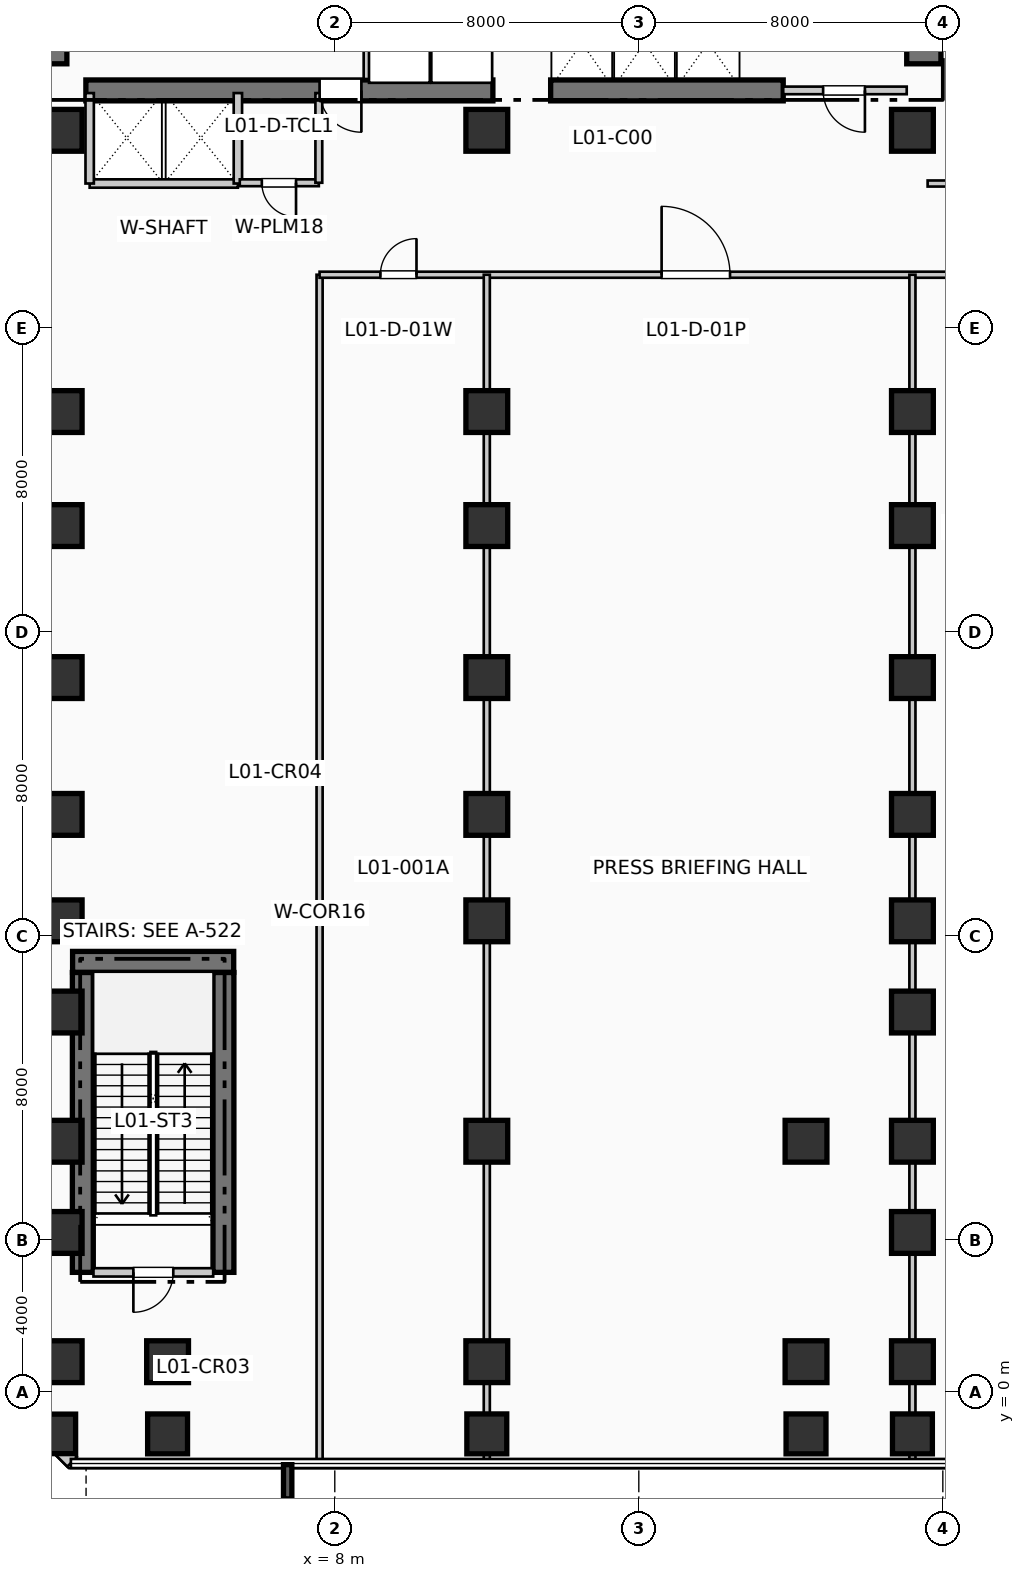
"""IFC4 building model, lengths in metres.
Left out: names, types, materials, properties, quantities, classifications, styles, units other than length and angle.
Written with IfcOpenShell. Run it as: python <this file> out.ifc"""

import sys

from ifc_helpers import new_model, si_unit, direction, frame, frame_2d, origin, origin_2d, place, context, subcontext, project, spatial, rectangle, extrude, element, fill, save


model = new_model("IFC4")
c1 = context("Model", 3, precision=1e-05, world=origin(), true_north=direction((0.0, 1.0)))
c2 = subcontext(c1, "Body", "Model", "MODEL_VIEW")
j1 = project(units=[si_unit("LENGTHUNIT", "METRE"), si_unit("PLANEANGLEUNIT", "RADIAN")], contexts=[c1])
p1 = place(None, origin())
s1 = spatial("IfcSite", under=j1, at=p1, CompositionType="ELEMENT")
p2 = place(p1, origin())
s2 = spatial("IfcBuilding", under=s1, at=p2, CompositionType="ELEMENT")
p3 = place(p2, frame((0.0, 0.0, 5.94)))
s3 = spatial("IfcBuildingStorey", under=s2, at=p3, CompositionType="ELEMENT", Elevation=5.94)
p4 = place(p3, frame((0.5, 34.95, 0.0), z_axis=(0.0, 0.0, 1.0), x_axis=(0.0, 1.0, 0.0)))
e1 = element("IfcWall", 1, at=p4, inside=s3, PredefinedType="SHEAR", context=c2, shape_type="SweptSolid", body=[
    extrude(rectangle(XDim=7.9, YDim=0.9, at=frame_2d((3.95, 0.0))), origin(), (0.0, 0.0, 1.0), 5.28),
])
p5 = place(p3, frame((23.5, 34.95, 0.0), z_axis=(0.0, 0.0, 1.0), x_axis=(0.0, 1.0, 0.0)))
e2 = element("IfcWall", 2, at=p5, inside=s3, PredefinedType="SHEAR", context=c2, shape_type="SweptSolid", body=[
    extrude(rectangle(XDim=10.64, YDim=0.9, at=frame_2d((5.32, 0.0))), origin(), (0.0, 0.0, 1.0), 5.28),
])
p6 = place(p3, frame((1.45, 34.25, 0.0), z_axis=(0.0, 0.0, 1.0), x_axis=(1.0, 0.0, 0.0)))
e3 = element("IfcWall", 3, at=p6, inside=s3, PredefinedType="SHEAR", context=c2, shape_type="SweptSolid", body=[
    extrude(rectangle(XDim=10.71, YDim=0.55, at=frame_2d((5.355, 0.0))), origin(), (0.0, 0.0, 1.0), 5.28),
])
p7 = place(p6, frame((7.25, 0.0, 0.0), z_axis=(0.0, 0.0, 1.0), x_axis=(-1.0, 0.0, 0.0)))
e4 = element("IfcOpeningElement", 4, at=p7, cuts=e3, PredefinedType="OPENING", context=c2, shape_type="SweptSolid", body=[
    extrude(rectangle(XDim=1.1, YDim=2.15, at=frame_2d((0.55, 1.075))), frame((0.0, 0.285, 0.0), z_axis=(0.0, -1.0, 0.0), x_axis=(1.0, 0.0, 0.0)), (0.0, 0.0, 1.0), 0.57),
])
p8 = place(p3, frame((13.68, 34.25, 0.0), z_axis=(0.0, 0.0, 1.0), x_axis=(1.0, 0.0, 0.0)))
e5 = element("IfcWall", 5, at=p8, inside=s3, PredefinedType="SHEAR", context=c2, shape_type="SweptSolid", body=[
    extrude(rectangle(XDim=6.12, YDim=0.55, at=frame_2d((3.06, 0.0))), origin(), (0.0, 0.0, 1.0), 5.28),
])
for number, where, z_axis, x_axis in (
    (6, (1.37, 3.15, 0.0), (0.0, 0.0, 1.0), (0.0, 1.0, 0.0)),
    (7, (5.07, 3.15, 0.0), (0.0, 0.0, 1.0), (0.0, 1.0, 0.0)),
):
    element("IfcWall", number, at=place(p3, frame(where, z_axis=z_axis, x_axis=x_axis)), inside=s3, PredefinedType="SHEAR", context=c2, shape_type="SweptSolid", body=[
        extrude(rectangle(XDim=7.89, YDim=0.55, at=frame_2d((3.945, 0.0))), origin(), (0.0, 0.0, 1.0), 5.28),
    ])
p9 = place(p3, frame((1.1, 11.32, 0.0), z_axis=(0.0, 0.0, 1.0), x_axis=(1.0, 0.0, 0.0)))
e8 = element("IfcWall", 8, at=p9, inside=s3, PredefinedType="SHEAR", context=c2, shape_type="SweptSolid", body=[
    extrude(rectangle(XDim=4.24, YDim=0.55, at=frame_2d((2.12, 0.0))), origin(), (0.0, 0.0, 1.0), 5.28),
])
p10 = place(p3, frame((0.8, -1.1, 0.0), z_axis=(0.0, 0.0, 1.0), x_axis=(1.0, 0.0, 0.0)))
e9 = element("IfcColumn", 9, at=p10, inside=s3, PredefinedType="PILASTER", context=c2, shape_type="SweptSolid", body=[
    extrude(rectangle(XDim=0.76, YDim=1.04, at=origin_2d()), origin(), (0.0, 0.0, 1.0), 5.28),
])
for number, where, z_axis, x_axis in (
    (10, (0.8, 0.8, 0.0), (0.0, 0.0, 1.0), (1.0, 0.0, 0.0)),
    (11, (0.8, 4.2, 0.0), (0.0, 0.0, 1.0), (1.0, 0.0, 0.0)),
    (12, (0.8, 6.6, 0.0), (0.0, 0.0, 1.0), (1.0, 0.0, 0.0)),
    (13, (0.8, 10.0, 0.0), (0.0, 0.0, 1.0), (1.0, 0.0, 0.0)),
    (14, (0.8, 12.4, 0.0), (0.0, 0.0, 1.0), (1.0, 0.0, 0.0)),
    (15, (0.8, 15.2, 0.0), (0.0, 0.0, 1.0), (1.0, 0.0, 0.0)),
    (16, (0.8, 18.8, 0.0), (0.0, 0.0, 1.0), (1.0, 0.0, 0.0)),
    (17, (0.8, 22.8, 0.0), (0.0, 0.0, 1.0), (1.0, 0.0, 0.0)),
    (18, (0.8, 25.8, 0.0), (0.0, 0.0, 1.0), (1.0, 0.0, 0.0)),
    (19, (0.8, 33.2, 0.0), (0.0, 0.0, 1.0), (1.0, 0.0, 0.0)),
):
    element("IfcColumn", number, at=place(p3, frame(where, z_axis=z_axis, x_axis=x_axis)), inside=s3, PredefinedType="COLUMN", context=c2, shape_type="SweptSolid", body=[
        extrude(rectangle(XDim=1.1, YDim=1.1, at=origin_2d()), origin(), (0.0, 0.0, 1.0), 5.28),
    ])
p11 = place(p3, frame((3.6, -1.1, 0.0), z_axis=(0.0, 0.0, 1.0), x_axis=(1.0, 0.0, 0.0)))
e20 = element("IfcColumn", 20, at=p11, inside=s3, PredefinedType="COLUMN", context=c2, shape_type="SweptSolid", body=[
    extrude(rectangle(XDim=1.05, YDim=1.05, at=origin_2d()), origin(), (0.0, 0.0, 1.0), 5.28),
])
p12 = place(p3, frame((3.6, 0.8, 0.0), z_axis=(0.0, 0.0, 1.0), x_axis=(1.0, 0.0, 0.0)))
e21 = element("IfcColumn", 21, at=p12, inside=s3, PredefinedType="COLUMN", context=c2, shape_type="SweptSolid", body=[
    extrude(rectangle(XDim=1.1, YDim=1.1, at=origin_2d()), origin(), (0.0, 0.0, 1.0), 5.28),
])
p13 = place(p3, frame((12.0, -1.1, 0.0), z_axis=(0.0, 0.0, 1.0), x_axis=(1.0, 0.0, 0.0)))
e22 = element("IfcColumn", 22, at=p13, inside=s3, PredefinedType="COLUMN", context=c2, shape_type="SweptSolid", body=[
    extrude(rectangle(XDim=1.05, YDim=1.05, at=origin_2d()), origin(), (0.0, 0.0, 1.0), 5.28),
])
for number, where, z_axis, x_axis in (
    (23, (12.0, 0.8, 0.0), (0.0, 0.0, 1.0), (1.0, 0.0, 0.0)),
    (24, (12.0, 6.6, 0.0), (0.0, 0.0, 1.0), (1.0, 0.0, 0.0)),
    (25, (12.0, 12.4, 0.0), (0.0, 0.0, 1.0), (1.0, 0.0, 0.0)),
    (26, (12.0, 15.2, 0.0), (0.0, 0.0, 1.0), (1.0, 0.0, 0.0)),
    (27, (12.0, 18.8, 0.0), (0.0, 0.0, 1.0), (1.0, 0.0, 0.0)),
    (28, (12.0, 22.8, 0.0), (0.0, 0.0, 1.0), (1.0, 0.0, 0.0)),
    (29, (12.0, 25.8, 0.0), (0.0, 0.0, 1.0), (1.0, 0.0, 0.0)),
    (30, (12.0, 33.2, 0.0), (0.0, 0.0, 1.0), (1.0, 0.0, 0.0)),
):
    element("IfcColumn", number, at=place(p3, frame(where, z_axis=z_axis, x_axis=x_axis)), inside=s3, PredefinedType="COLUMN", context=c2, shape_type="SweptSolid", body=[
        extrude(rectangle(XDim=1.1, YDim=1.1, at=origin_2d()), origin(), (0.0, 0.0, 1.0), 5.28),
    ])
p14 = place(p3, frame((20.4, -1.1, 0.0), z_axis=(0.0, 0.0, 1.0), x_axis=(1.0, 0.0, 0.0)))
e31 = element("IfcColumn", 31, at=p14, inside=s3, PredefinedType="COLUMN", context=c2, shape_type="SweptSolid", body=[
    extrude(rectangle(XDim=1.05, YDim=1.05, at=origin_2d()), origin(), (0.0, 0.0, 1.0), 5.28),
])
for number, where, z_axis, x_axis in (
    (32, (20.4, 0.8, 0.0), (0.0, 0.0, 1.0), (1.0, 0.0, 0.0)),
    (33, (20.4, 6.6, 0.0), (0.0, 0.0, 1.0), (1.0, 0.0, 0.0)),
):
    element("IfcColumn", number, at=place(p3, frame(where, z_axis=z_axis, x_axis=x_axis)), inside=s3, PredefinedType="COLUMN", context=c2, shape_type="SweptSolid", body=[
        extrude(rectangle(XDim=1.1, YDim=1.1, at=origin_2d()), origin(), (0.0, 0.0, 1.0), 5.28),
    ])
p15 = place(p3, frame((23.2, -1.1, 0.0), z_axis=(0.0, 0.0, 1.0), x_axis=(1.0, 0.0, 0.0)))
e34 = element("IfcColumn", 34, at=p15, inside=s3, PredefinedType="COLUMN", context=c2, shape_type="SweptSolid", body=[
    extrude(rectangle(XDim=1.05, YDim=1.05, at=origin_2d()), origin(), (0.0, 0.0, 1.0), 5.28),
])
for number, where, z_axis, x_axis in (
    (35, (23.2, 0.8, 0.0), (0.0, 0.0, 1.0), (1.0, 0.0, 0.0)),
    (36, (23.2, 4.2, 0.0), (0.0, 0.0, 1.0), (1.0, 0.0, 0.0)),
    (37, (23.2, 6.6, 0.0), (0.0, 0.0, 1.0), (1.0, 0.0, 0.0)),
    (38, (23.2, 10.0, 0.0), (0.0, 0.0, 1.0), (1.0, 0.0, 0.0)),
    (39, (23.2, 12.4, 0.0), (0.0, 0.0, 1.0), (1.0, 0.0, 0.0)),
    (40, (23.2, 15.2, 0.0), (0.0, 0.0, 1.0), (1.0, 0.0, 0.0)),
    (41, (23.2, 18.8, 0.0), (0.0, 0.0, 1.0), (1.0, 0.0, 0.0)),
    (42, (23.2, 22.8, 0.0), (0.0, 0.0, 1.0), (1.0, 0.0, 0.0)),
    (43, (23.2, 25.8, 0.0), (0.0, 0.0, 1.0), (1.0, 0.0, 0.0)),
    (44, (23.2, 33.2, 0.0), (0.0, 0.0, 1.0), (1.0, 0.0, 0.0)),
):
    element("IfcColumn", number, at=place(p3, frame(where, z_axis=z_axis, x_axis=x_axis)), inside=s3, PredefinedType="COLUMN", context=c2, shape_type="SweptSolid", body=[
        extrude(rectangle(XDim=1.1, YDim=1.1, at=origin_2d()), origin(), (0.0, 0.0, 1.0), 5.28),
    ])
p16 = place(p3, frame((-1.834, 1.088, 0.0), z_axis=(0.0, 0.0, 1.0), x_axis=(0.707106781187, -0.707106781187, 0.0)))
e45 = element("IfcWall", 45, at=p16, inside=s3, PredefinedType="SOLIDWALL", context=c2, shape_type="SweptSolid", body=[
    extrude(rectangle(XDim=4.133, YDim=0.36, at=frame_2d((2.066, 0.0))), origin(), (0.0, 0.0, 1.0), 4.96),
])
p17 = place(p3, frame((8.86, 34.55, 0.0), z_axis=(0.0, 0.0, 1.0), x_axis=(0.0, 1.0, 0.0)))
e46 = element("IfcWall", 46, at=p17, inside=s3, PredefinedType="PARTITIONING", context=c2, shape_type="SweptSolid", body=[
    extrude(rectangle(XDim=2.5, YDim=0.2, at=frame_2d((1.25, 0.0))), origin(), (0.0, 0.0, 1.0), 4.96),
])
p18 = place(p3, frame((19.8, 34.25, 0.0), z_axis=(0.0, 0.0, 1.0), x_axis=(1.0, 0.0, 0.0)))
e47 = element("IfcWall", 47, at=p18, inside=s3, PredefinedType="PARTITIONING", context=c2, shape_type="SweptSolid", body=[
    extrude(rectangle(XDim=3.25, YDim=0.2, at=frame_2d((1.625, 0.0))), origin(), (0.0, 0.0, 1.0), 4.96),
])
p19 = place(p18, frame((2.15, 0.0, 0.0), z_axis=(0.0, 0.0, 1.0), x_axis=(-1.0, 0.0, 0.0)))
e48 = element("IfcOpeningElement", 48, at=p19, cuts=e47, PredefinedType="OPENING", context=c2, shape_type="SweptSolid", body=[
    extrude(rectangle(XDim=1.1, YDim=2.15, at=frame_2d((0.55, 1.075))), frame((0.0, 0.11, 0.0), z_axis=(0.0, -1.0, 0.0), x_axis=(1.0, 0.0, 0.0)), (0.0, 0.0, 1.0), 0.22),
])
p20 = place(p3, frame((1.55, 31.8, 0.0), z_axis=(0.0, 0.0, 1.0), x_axis=(1.0, 0.0, 0.0)))
e49 = element("IfcWall", 49, at=p20, inside=s3, PredefinedType="PARTITIONING", context=c2, shape_type="SweptSolid", body=[
    extrude(rectangle(XDim=3.9, YDim=0.22, at=frame_2d((1.95, 0.0))), origin(), (0.0, 0.0, 1.0), 4.96),
])
for number, where, z_axis, x_axis in (
    (50, (1.55, 31.8, 0.0), (0.0, 0.0, 1.0), (0.0, 1.0, 0.0)),
    (51, (5.45, 31.8, 0.0), (0.0, 0.0, 1.0), (0.0, 1.0, 0.0)),
):
    element("IfcWall", number, at=place(p3, frame(where, z_axis=z_axis, x_axis=x_axis)), inside=s3, PredefinedType="PARTITIONING", context=c2, shape_type="SweptSolid", body=[
        extrude(rectangle(XDim=2.38, YDim=0.22, at=frame_2d((1.19, 0.0))), origin(), (0.0, 0.0, 1.0), 4.96),
    ])
p21 = place(p3, frame((5.5, 31.82, 0.0), z_axis=(0.0, 0.0, 1.0), x_axis=(1.0, 0.0, 0.0)))
e52 = element("IfcWall", 52, at=p21, inside=s3, PredefinedType="PLUMBINGWALL", context=c2, shape_type="SweptSolid", body=[
    extrude(rectangle(XDim=2.08, YDim=0.18, at=frame_2d((1.04, 0.0))), origin(), (0.0, 0.0, 1.0), 4.96),
])
p22 = place(p21, frame((1.48, 0.0, 0.0), z_axis=(0.0, 0.0, 1.0), x_axis=(-1.0, 0.0, 0.0)))
e53 = element("IfcOpeningElement", 53, at=p22, cuts=e52, PredefinedType="OPENING", context=c2, shape_type="SweptSolid", body=[
    extrude(rectangle(XDim=0.9, YDim=2.1, at=frame_2d((0.45, 1.05))), frame((0.0, 0.1, 0.0), z_axis=(0.0, -1.0, 0.0), x_axis=(1.0, 0.0, 0.0)), (0.0, 0.0, 1.0), 0.2),
])
p23 = place(p3, frame((7.58, 31.82, 0.0), z_axis=(0.0, 0.0, 1.0), x_axis=(0.0, 1.0, 0.0)))
e54 = element("IfcWall", 54, at=p23, inside=s3, PredefinedType="PLUMBINGWALL", context=c2, shape_type="SweptSolid", body=[
    extrude(rectangle(XDim=2.36, YDim=0.18, at=frame_2d((1.18, 0.0))), origin(), (0.0, 0.0, 1.0), 4.96),
])
p24 = place(p3, frame((1.65, 3.15, 0.0), z_axis=(0.0, 0.0, 1.0), x_axis=(1.0, 0.0, 0.0)))
e55 = element("IfcWall", 55, at=p24, inside=s3, PredefinedType="PARTITIONING", context=c2, shape_type="SweptSolid", body=[
    extrude(rectangle(XDim=3.15, YDim=0.22, at=frame_2d((1.575, 0.0))), origin(), (0.0, 0.0, 1.0), 4.96),
])
p25 = place(p24, frame((2.1, 0.0, 0.0), z_axis=(0.0, 0.0, 1.0), x_axis=(-1.0, 0.0, 0.0)))
e56 = element("IfcOpeningElement", 56, at=p25, cuts=e55, PredefinedType="OPENING", context=c2, shape_type="SweptSolid", body=[
    extrude(rectangle(XDim=1.05, YDim=2.15, at=frame_2d((0.525, 1.075))), frame((0.0, 0.12, 0.0), z_axis=(0.0, -1.0, 0.0), x_axis=(1.0, 0.0, 0.0)), (0.0, 0.0, 1.0), 0.24),
])
p26 = place(p3, frame((7.6, -1.81, 0.0), z_axis=(0.0, 0.0, 1.0), x_axis=(0.0, 1.0, 0.0)))
e57 = element("IfcWall", 57, at=p26, inside=s3, PredefinedType="PARTITIONING", context=c2, shape_type="SweptSolid", body=[
    extrude(rectangle(XDim=31.21, YDim=0.16, at=frame_2d((15.605, 0.0))), origin(), (0.0, 0.0, 1.0), 3.895),
])
p27 = place(p3, frame((7.6, 29.4, 0.0), z_axis=(0.0, 0.0, 1.0), x_axis=(1.0, 0.0, 0.0)))
e58 = element("IfcWall", 58, at=p27, inside=s3, PredefinedType="PARTITIONING", context=c2, shape_type="SweptSolid", body=[
    extrude(rectangle(XDim=43.75, YDim=0.16, at=frame_2d((21.875, 0.0))), origin(), (0.0, 0.0, 1.0), 4.615),
])
p28 = place(p27, frame((17.5, 0.0, 0.0)))
e59 = element("IfcOpeningElement", 59, at=p28, cuts=e58, PredefinedType="OPENING", context=c2, shape_type="SweptSolid", body=[
    extrude(rectangle(XDim=1.8, YDim=2.3, at=frame_2d((0.9, 1.15))), frame((0.0, 0.09, 0.0), z_axis=(0.0, -1.0, 0.0), x_axis=(1.0, 0.0, 0.0)), (0.0, 0.0, 1.0), 0.18),
])
p29 = place(p27, frame((1.6, 0.0, 0.0)))
e60 = element("IfcOpeningElement", 60, at=p29, cuts=e58, PredefinedType="OPENING", context=c2, shape_type="SweptSolid", body=[
    extrude(rectangle(XDim=0.95, YDim=2.15, at=frame_2d((0.475, 1.075))), frame((0.0, 0.09, 0.0), z_axis=(0.0, -1.0, 0.0), x_axis=(1.0, 0.0, 0.0)), (0.0, 0.0, 1.0), 0.18),
])
p30 = place(p27, frame((9.0, 0.0, 0.0)))
e61 = element("IfcOpeningElement", 61, at=p30, cuts=e58, PredefinedType="OPENING", context=c2, shape_type="SweptSolid", body=[
    extrude(rectangle(XDim=1.8, YDim=2.3, at=frame_2d((0.9, 1.15))), frame((0.0, 0.09, 0.0), z_axis=(0.0, -1.0, 0.0), x_axis=(1.0, 0.0, 0.0)), (0.0, 0.0, 1.0), 0.18),
])
p31 = place(p27, frame((26.5, 0.0, 0.0)))
e62 = element("IfcOpeningElement", 62, at=p31, cuts=e58, PredefinedType="OPENING", context=c2, shape_type="SweptSolid", body=[
    extrude(rectangle(XDim=0.95, YDim=2.15, at=frame_2d((0.475, 1.075))), frame((0.0, 0.09, 0.0), z_axis=(0.0, -1.0, 0.0), x_axis=(1.0, 0.0, 0.0)), (0.0, 0.0, 1.0), 0.18),
])
p32 = place(p27, frame((35.0, 0.0, 0.0)))
e63 = element("IfcOpeningElement", 63, at=p32, cuts=e58, PredefinedType="OPENING", context=c2, shape_type="SweptSolid", body=[
    extrude(rectangle(XDim=0.95, YDim=2.15, at=frame_2d((0.475, 1.075))), frame((0.0, 0.09, 0.0), z_axis=(0.0, -1.0, 0.0), x_axis=(1.0, 0.0, 0.0)), (0.0, 0.0, 1.0), 0.18),
])
for number, where, z_axis, x_axis in (
    (64, (12.0, -1.81, 0.0), (0.0, 0.0, 1.0), (0.0, 1.0, 0.0)),
    (65, (23.2, -1.81, 0.0), (0.0, 0.0, 1.0), (0.0, 1.0, 0.0)),
):
    element("IfcWall", number, at=place(p3, frame(where, z_axis=z_axis, x_axis=x_axis)), inside=s3, PredefinedType="PARTITIONING", context=c2, shape_type="SweptSolid", body=[
        extrude(rectangle(XDim=31.21, YDim=0.16, at=frame_2d((15.605, 0.0))), origin(), (0.0, 0.0, 1.0), 4.145),
    ])
p33 = place(p3, frame((23.6, 31.8, 0.0), z_axis=(0.0, 0.0, 1.0), x_axis=(1.0, 0.0, 0.0)))
e66 = element("IfcWall", 66, at=p33, inside=s3, PredefinedType="PARTITIONING", context=c2, shape_type="SweptSolid", body=[
    extrude(rectangle(XDim=58.21, YDim=0.16, at=frame_2d((29.105, 0.0))), origin(), (0.0, 0.0, 1.0), 4.96),
])
p34 = place(p33, frame((5.0, 0.0, 0.0)))
e67 = element("IfcOpeningElement", 67, at=p34, cuts=e66, PredefinedType="OPENING", context=c2, shape_type="SweptSolid", body=[
    extrude(rectangle(XDim=0.95, YDim=2.15, at=frame_2d((0.475, 1.075))), frame((0.0, 0.09, 0.0), z_axis=(0.0, -1.0, 0.0), x_axis=(1.0, 0.0, 0.0)), (0.0, 0.0, 1.0), 0.18),
])
p35 = place(p33, frame((24.0, 0.0, 0.0)))
e68 = element("IfcOpeningElement", 68, at=p35, cuts=e66, PredefinedType="OPENING", context=c2, shape_type="SweptSolid", body=[
    extrude(rectangle(XDim=0.95, YDim=2.15, at=frame_2d((0.475, 1.075))), frame((0.0, 0.09, 0.0), z_axis=(0.0, -1.0, 0.0), x_axis=(1.0, 0.0, 0.0)), (0.0, 0.0, 1.0), 0.18),
])
p36 = place(p33, frame((44.0, 0.0, 0.0)))
e69 = element("IfcOpeningElement", 69, at=p36, cuts=e66, PredefinedType="OPENING", context=c2, shape_type="SweptSolid", body=[
    extrude(rectangle(XDim=0.95, YDim=2.15, at=frame_2d((0.475, 1.075))), frame((0.0, 0.09, 0.0), z_axis=(0.0, -1.0, 0.0), x_axis=(1.0, 0.0, 0.0)), (0.0, 0.0, 1.0), 0.18),
])
p37 = place(p7, origin())
e70 = element("IfcDoor", 70, at=p37, inside=s3, OperationType="SINGLE_SWING_RIGHT", PredefinedType="DOOR", context=c2, shape_type="SweptSolid", body=[
    extrude(rectangle(XDim=1.1, YDim=2.15, at=frame_2d((0.55, 1.075))), frame((0.0, 0.025, 0.0), z_axis=(0.0, -1.0, 0.0), x_axis=(1.0, 0.0, 0.0)), (0.0, 0.0, 1.0), 0.05),
])
fill(e4, e70)
p38 = place(p19, origin())
e71 = element("IfcDoor", 71, at=p38, inside=s3, OperationType="SINGLE_SWING_RIGHT", PredefinedType="DOOR", context=c2, shape_type="SweptSolid", body=[
    extrude(rectangle(XDim=1.1, YDim=2.15, at=frame_2d((0.55, 1.075))), frame((0.0, 0.025, 0.0), z_axis=(0.0, -1.0, 0.0), x_axis=(1.0, 0.0, 0.0)), (0.0, 0.0, 1.0), 0.05),
])
fill(e48, e71)
p39 = place(p22, origin())
e72 = element("IfcDoor", 72, at=p39, inside=s3, OperationType="SINGLE_SWING_RIGHT", PredefinedType="DOOR", context=c2, shape_type="SweptSolid", body=[
    extrude(rectangle(XDim=0.9, YDim=2.1, at=frame_2d((0.45, 1.05))), frame((0.0, 0.025, 0.0), z_axis=(0.0, -1.0, 0.0), x_axis=(1.0, 0.0, 0.0)), (0.0, 0.0, 1.0), 0.05),
])
fill(e53, e72)
p40 = place(p25, origin())
e73 = element("IfcDoor", 73, at=p40, inside=s3, OperationType="SINGLE_SWING_LEFT", PredefinedType="DOOR", context=c2, shape_type="SweptSolid", body=[
    extrude(rectangle(XDim=1.05, YDim=2.15, at=frame_2d((0.525, 1.075))), frame((0.0, 0.025, 0.0), z_axis=(0.0, -1.0, 0.0), x_axis=(1.0, 0.0, 0.0)), (0.0, 0.0, 1.0), 0.05),
])
fill(e56, e73)
p41 = place(p29, origin())
e74 = element("IfcDoor", 74, at=p41, inside=s3, OperationType="SINGLE_SWING_RIGHT", PredefinedType="DOOR", context=c2, shape_type="SweptSolid", body=[
    extrude(rectangle(XDim=0.95, YDim=2.15, at=frame_2d((0.475, 1.075))), frame((0.0, 0.025, 0.0), z_axis=(0.0, -1.0, 0.0), x_axis=(1.0, 0.0, 0.0)), (0.0, 0.0, 1.0), 0.05),
])
fill(e60, e74)
p42 = place(p30, origin())
e75 = element("IfcDoor", 75, at=p42, inside=s3, OperationType="SINGLE_SWING_LEFT", PredefinedType="DOOR", context=c2, shape_type="SweptSolid", body=[
    extrude(rectangle(XDim=1.8, YDim=2.3, at=frame_2d((0.9, 1.15))), frame((0.0, 0.025, 0.0), z_axis=(0.0, -1.0, 0.0), x_axis=(1.0, 0.0, 0.0)), (0.0, 0.0, 1.0), 0.05),
])
fill(e61, e75)
save(model, sys.argv[1])
